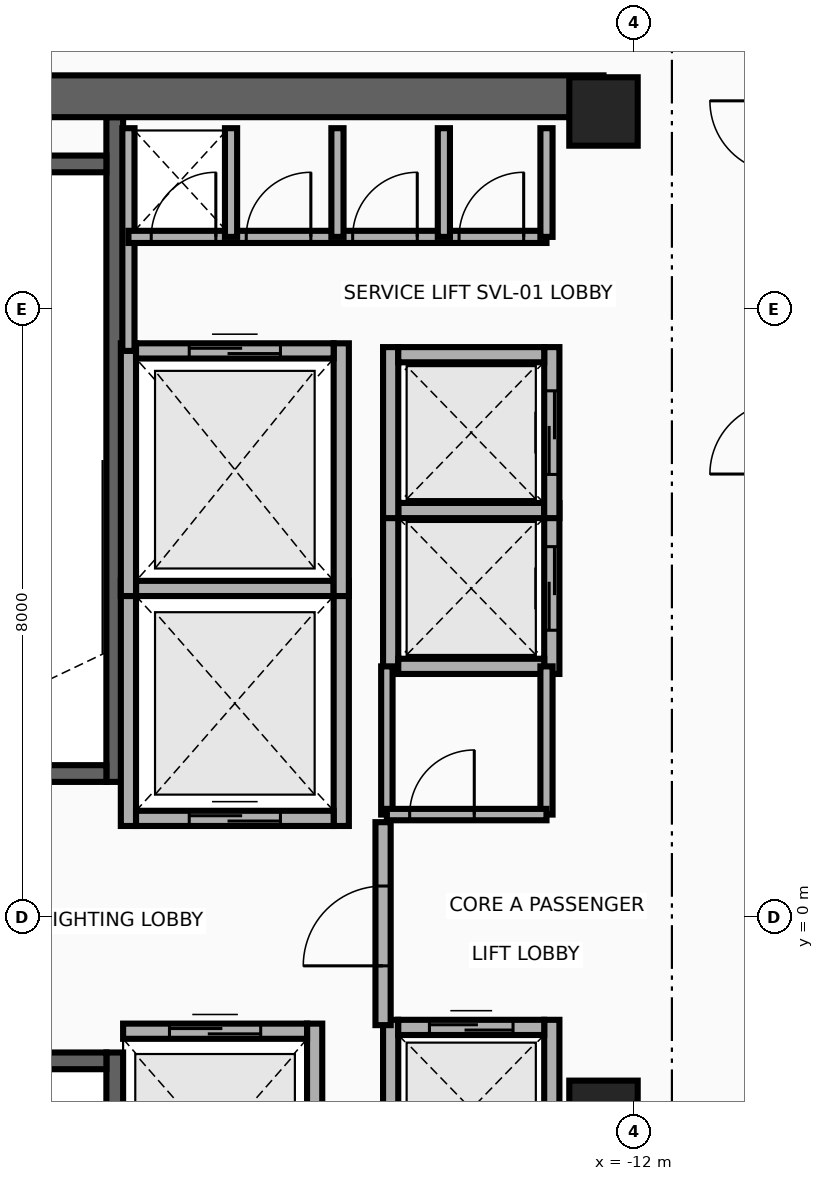
"""IFC4 building model, lengths in metres.
Left out: names, types, materials, properties, quantities, classifications, styles, units other than length and angle.
Written with IfcOpenShell. Run it as: python <this file> out.ifc"""

import sys

from ifc_helpers import new_model, si_unit, direction, frame, frame_2d, origin, origin_2d, place, context, subcontext, project, spatial, rectangle, extrude, source, transform, mapped, element, fill, save


model = new_model("IFC4")
c1 = context("Model", 3, precision=1e-05, world=origin(), true_north=direction((0.0, 1.0)))
c2 = subcontext(c1, "Body", "Model", "MODEL_VIEW")
j1 = project(units=[si_unit("LENGTHUNIT", "METRE"), si_unit("PLANEANGLEUNIT", "RADIAN")], contexts=[c1])
p1 = place(None, origin())
s1 = spatial("IfcSite", under=j1, at=p1, CompositionType="ELEMENT")
p2 = place(p1, origin())
s2 = spatial("IfcBuilding", under=s1, at=p2, CompositionType="ELEMENT")
p3 = place(p2, frame((0.0, 0.0, 216.0)))
s3 = spatial("IfcBuildingStorey", under=s2, at=p3, CompositionType="ELEMENT", Elevation=216.0)
p4 = place(p3, frame((-18.83, 1.78, 0.0), z_axis=(0.0, 0.0, 1.0), x_axis=(0.0, 1.0, 0.0)))
e1 = element("IfcWall", 1, at=p4, inside=s3, PredefinedType="SHEAR", context=c2, shape_type="SweptSolid", body=[
    extrude(rectangle(XDim=8.745, YDim=0.22, at=frame_2d((4.373, 0.0))), origin(), (0.0, 0.0, 1.0), 3.26),
])
p5 = place(p3, frame((-22.05, 1.89, 0.0), z_axis=(0.0, 0.0, 1.0), x_axis=(1.0, 0.0, 0.0)))
e2 = element("IfcWall", 2, at=p5, inside=s3, PredefinedType="SHEAR", context=c2, shape_type="SweptSolid", body=[
    extrude(rectangle(XDim=3.11, YDim=0.22, at=frame_2d((1.555, 0.0))), origin(), (0.0, 0.0, 1.0), 3.26),
])
p6 = place(p5, frame((1.0, 0.0, 0.0)))
e3 = element("IfcOpeningElement", 3, at=p6, cuts=e2, PredefinedType="OPENING", context=c2, shape_type="SweptSolid", body=[
    extrude(rectangle(XDim=1.1, YDim=2.15, at=frame_2d((0.55, 1.075))), frame((0.0, 0.125, 0.0), z_axis=(0.0, -1.0, 0.0), x_axis=(1.0, 0.0, 0.0)), (0.0, 0.0, 1.0), 0.25),
])
p7 = place(p3, frame((-22.05, 9.91, 0.0), z_axis=(0.0, 0.0, 1.0), x_axis=(1.0, 0.0, 0.0)))
e4 = element("IfcWall", 4, at=p7, inside=s3, PredefinedType="SHEAR", context=c2, shape_type="SweptSolid", body=[
    extrude(rectangle(XDim=3.11, YDim=0.22, at=frame_2d((1.555, 0.0))), origin(), (0.0, 0.0, 1.0), 3.26),
])
p8 = place(p3, frame((-18.83, -10.525, 0.0), z_axis=(0.0, 0.0, 1.0), x_axis=(0.0, 1.0, 0.0)))
e5 = element("IfcWall", 5, at=p8, inside=s3, PredefinedType="SHEAR", context=c2, shape_type="SweptSolid", body=[
    extrude(rectangle(XDim=8.745, YDim=0.22, at=frame_2d((4.373, 0.0))), origin(), (0.0, 0.0, 1.0), 3.26),
])
p9 = place(p3, frame((-22.05, -1.89, 0.0), z_axis=(0.0, 0.0, 1.0), x_axis=(1.0, 0.0, 0.0)))
e6 = element("IfcWall", 6, at=p9, inside=s3, PredefinedType="SHEAR", context=c2, shape_type="SweptSolid", body=[
    extrude(rectangle(XDim=3.11, YDim=0.22, at=frame_2d((1.555, 0.0))), origin(), (0.0, 0.0, 1.0), 3.26),
])
p10 = place(p9, frame((1.0, 0.0, 0.0)))
e7 = element("IfcOpeningElement", 7, at=p10, cuts=e6, PredefinedType="OPENING", context=c2, shape_type="SweptSolid", body=[
    extrude(rectangle(XDim=1.1, YDim=2.15, at=frame_2d((0.55, 1.075))), frame((0.0, 0.125, 0.0), z_axis=(0.0, -1.0, 0.0), x_axis=(1.0, 0.0, 0.0)), (0.0, 0.0, 1.0), 0.25),
])
p11 = place(p3, frame((-22.65, 10.8, 0.0), z_axis=(0.0, 0.0, 1.0), x_axis=(1.0, 0.0, 0.0)))
e8 = element("IfcWall", 8, at=p11, inside=s3, PredefinedType="SHEAR", context=c2, shape_type="SweptSolid", body=[
    extrude(rectangle(XDim=10.25, YDim=0.55, at=frame_2d((5.125, 0.0))), origin(), (0.0, 0.0, 1.0), 3.26),
])
m1 = source(origin(), c2, "Body", "SweptSolid", [
    extrude(rectangle(XDim=0.9, YDim=0.9, at=origin_2d()), origin(), (0.0, 0.0, 1.0), 3.5),
])
for number, where, z_axis, x_axis in (
    (9, (-12.4, -2.6, 0.0), (0.0, 0.0, 1.0), (1.0, 0.0, 0.0)),
    (10, (-12.4, 10.6, 0.0), (0.0, 0.0, 1.0), (1.0, 0.0, 0.0)),
):
    element("IfcColumn", number, at=place(p3, frame(where, z_axis=z_axis, x_axis=x_axis)), inside=s3, PredefinedType="COLUMN", context=c2, shape_type="MappedRepresentation", body=[
        mapped(m1, transform((0.0, 0.0, 0.0), x_axis=(1.0, 0.0, 0.0), y_axis=(0.0, 1.0, 0.0), z_axis=(0.0, 0.0, 1.0), scale=1.0)),
    ])
for number, where, z_axis, x_axis in (
    (11, (-18.65, 1.2, 0.0), (0.0, 0.0, 1.0), (0.0, 1.0, 0.0)),
    (12, (-15.85, 1.2, 0.0), (0.0, 0.0, 1.0), (0.0, 1.0, 0.0)),
):
    element("IfcWall", number, at=place(p3, frame(where, z_axis=z_axis, x_axis=x_axis)), inside=s3, PredefinedType="MOVABLE", context=c2, shape_type="SweptSolid", body=[
        extrude(rectangle(XDim=3.225, YDim=0.2, at=frame_2d((1.613, 0.0))), origin(), (0.0, 0.0, 1.0), 3.26),
    ])
p12 = place(p3, frame((-18.55, 1.3, 0.0), z_axis=(0.0, 0.0, 1.0), x_axis=(1.0, 0.0, 0.0)))
e13 = element("IfcWall", 13, at=p12, inside=s3, PredefinedType="MOVABLE", context=c2, shape_type="SweptSolid", body=[
    extrude(rectangle(XDim=2.6, YDim=0.2, at=frame_2d((1.3, 0.0))), origin(), (0.0, 0.0, 1.0), 3.26),
])
p13 = place(p12, frame((0.7, 0.0, 0.0)))
e14 = element("IfcOpeningElement", 14, at=p13, cuts=e13, PredefinedType="OPENING", context=c2, shape_type="SweptSolid", body=[
    extrude(rectangle(XDim=1.2, YDim=2.1, at=frame_2d((0.6, 1.05))), frame((0.0, 0.115, 0.0), z_axis=(0.0, -1.0, 0.0), x_axis=(1.0, 0.0, 0.0)), (0.0, 0.0, 1.0), 0.23),
])
p14 = place(p3, frame((-18.55, 4.325, 0.0), z_axis=(0.0, 0.0, 1.0), x_axis=(1.0, 0.0, 0.0)))
e15 = element("IfcWall", 15, at=p14, inside=s3, PredefinedType="MOVABLE", context=c2, shape_type="SweptSolid", body=[
    extrude(rectangle(XDim=2.6, YDim=0.2, at=frame_2d((1.3, 0.0))), origin(), (0.0, 0.0, 1.0), 3.26),
])
p15 = place(p3, frame((-16.2, -4.6, 0.0), z_axis=(0.0, 0.0, 1.0), x_axis=(0.0, 1.0, 0.0)))
e16 = element("IfcWall", 16, at=p15, inside=s3, PredefinedType="MOVABLE", context=c2, shape_type="SweptSolid", body=[
    extrude(rectangle(XDim=3.2, YDim=0.2, at=frame_2d((1.6, 0.0))), origin(), (0.0, 0.0, 1.0), 3.26),
])
p16 = place(p3, frame((-18.72, -1.5, 0.0), z_axis=(0.0, 0.0, 1.0), x_axis=(1.0, 0.0, 0.0)))
e17 = element("IfcWall", 17, at=p16, inside=s3, PredefinedType="MOVABLE", context=c2, shape_type="SweptSolid", body=[
    extrude(rectangle(XDim=2.42, YDim=0.2, at=frame_2d((1.21, 0.0))), origin(), (0.0, 0.0, 1.0), 3.26),
])
p17 = place(p16, frame((0.61, 0.0, 0.0)))
e18 = element("IfcOpeningElement", 18, at=p17, cuts=e17, PredefinedType="OPENING", context=c2, shape_type="SweptSolid", body=[
    extrude(rectangle(XDim=1.2, YDim=2.1, at=frame_2d((0.6, 1.05))), frame((0.0, 0.115, 0.0), z_axis=(0.0, -1.0, 0.0), x_axis=(1.0, 0.0, 0.0)), (0.0, 0.0, 1.0), 0.23),
])
for number, where, z_axis, x_axis in (
    (19, (-18.65, 4.225, 0.0), (0.0, 0.0, 1.0), (0.0, 1.0, 0.0)),
    (20, (-15.85, 4.225, 0.0), (0.0, 0.0, 1.0), (0.0, 1.0, 0.0)),
):
    element("IfcWall", number, at=place(p3, frame(where, z_axis=z_axis, x_axis=x_axis)), inside=s3, PredefinedType="MOVABLE", context=c2, shape_type="SweptSolid", body=[
        extrude(rectangle(XDim=3.325, YDim=0.2, at=frame_2d((1.663, 0.0))), origin(), (0.0, 0.0, 1.0), 3.26),
    ])
p18 = place(p3, frame((-18.55, 7.45, 0.0), z_axis=(0.0, 0.0, 1.0), x_axis=(1.0, 0.0, 0.0)))
e21 = element("IfcWall", 21, at=p18, inside=s3, PredefinedType="MOVABLE", context=c2, shape_type="SweptSolid", body=[
    extrude(rectangle(XDim=2.6, YDim=0.2, at=frame_2d((1.3, 0.0))), origin(), (0.0, 0.0, 1.0), 3.26),
])
p19 = place(p18, frame((0.7, 0.0, 0.0)))
e22 = element("IfcOpeningElement", 22, at=p19, cuts=e21, PredefinedType="OPENING", context=c2, shape_type="SweptSolid", body=[
    extrude(rectangle(XDim=1.2, YDim=2.1, at=frame_2d((0.6, 1.05))), frame((0.0, 0.115, 0.0), z_axis=(0.0, -1.0, 0.0), x_axis=(1.0, 0.0, 0.0)), (0.0, 0.0, 1.0), 0.23),
])
p20 = place(p3, frame((-15.2, 3.2, 0.0), z_axis=(0.0, 0.0, 1.0), x_axis=(0.0, 1.0, 0.0)))
e23 = element("IfcWall", 23, at=p20, inside=s3, PredefinedType="MOVABLE", context=c2, shape_type="SweptSolid", body=[
    extrude(rectangle(XDim=2.25, YDim=0.2, at=frame_2d((1.125, 0.0))), origin(), (0.0, 0.0, 1.0), 3.26),
])
p21 = place(p3, frame((-13.08, 3.2, 0.0), z_axis=(0.0, 0.0, 1.0), x_axis=(0.0, 1.0, 0.0)))
e24 = element("IfcWall", 24, at=p21, inside=s3, PredefinedType="MOVABLE", context=c2, shape_type="SweptSolid", body=[
    extrude(rectangle(XDim=2.25, YDim=0.2, at=frame_2d((1.125, 0.0))), origin(), (0.0, 0.0, 1.0), 3.26),
])
p22 = place(p21, frame((0.575, 0.0, 0.0)))
e25 = element("IfcOpeningElement", 25, at=p22, cuts=e24, PredefinedType="OPENING", context=c2, shape_type="SweptSolid", body=[
    extrude(rectangle(XDim=1.1, YDim=2.1, at=frame_2d((0.55, 1.05))), frame((0.0, 0.115, 0.0), z_axis=(0.0, -1.0, 0.0), x_axis=(1.0, 0.0, 0.0)), (0.0, 0.0, 1.0), 0.23),
])
for number, where, z_axis, x_axis in (
    (26, (-15.1, 3.3, 0.0), (0.0, 0.0, 1.0), (1.0, 0.0, 0.0)),
    (27, (-15.1, 5.35, 0.0), (0.0, 0.0, 1.0), (1.0, 0.0, 0.0)),
):
    element("IfcWall", number, at=place(p3, frame(where, z_axis=z_axis, x_axis=x_axis)), inside=s3, PredefinedType="MOVABLE", context=c2, shape_type="SweptSolid", body=[
        extrude(rectangle(XDim=1.92, YDim=0.2, at=frame_2d((0.96, 0.0))), origin(), (0.0, 0.0, 1.0), 3.26),
    ])
p23 = place(p3, frame((-15.2, 5.25, 0.0), z_axis=(0.0, 0.0, 1.0), x_axis=(0.0, 1.0, 0.0)))
e28 = element("IfcWall", 28, at=p23, inside=s3, PredefinedType="MOVABLE", context=c2, shape_type="SweptSolid", body=[
    extrude(rectangle(XDim=2.25, YDim=0.2, at=frame_2d((1.125, 0.0))), origin(), (0.0, 0.0, 1.0), 3.26),
])
p24 = place(p3, frame((-13.08, 5.25, 0.0), z_axis=(0.0, 0.0, 1.0), x_axis=(0.0, 1.0, 0.0)))
e29 = element("IfcWall", 29, at=p24, inside=s3, PredefinedType="MOVABLE", context=c2, shape_type="SweptSolid", body=[
    extrude(rectangle(XDim=2.25, YDim=0.2, at=frame_2d((1.125, 0.0))), origin(), (0.0, 0.0, 1.0), 3.26),
])
p25 = place(p24, frame((0.575, 0.0, 0.0)))
e30 = element("IfcOpeningElement", 30, at=p25, cuts=e29, PredefinedType="OPENING", context=c2, shape_type="SweptSolid", body=[
    extrude(rectangle(XDim=1.1, YDim=2.1, at=frame_2d((0.55, 1.05))), frame((0.0, 0.115, 0.0), z_axis=(0.0, -1.0, 0.0), x_axis=(1.0, 0.0, 0.0)), (0.0, 0.0, 1.0), 0.23),
])
p26 = place(p3, frame((-15.1, 7.4, 0.0), z_axis=(0.0, 0.0, 1.0), x_axis=(1.0, 0.0, 0.0)))
e31 = element("IfcWall", 31, at=p26, inside=s3, PredefinedType="MOVABLE", context=c2, shape_type="SweptSolid", body=[
    extrude(rectangle(XDim=1.92, YDim=0.2, at=frame_2d((0.96, 0.0))), origin(), (0.0, 0.0, 1.0), 3.26),
])
for number, where, z_axis, x_axis in (
    (32, (-15.2, -3.7, 0.0), (0.0, 0.0, 1.0), (0.0, 1.0, 0.0)),
    (33, (-13.08, -3.7, 0.0), (0.0, 0.0, 1.0), (0.0, 1.0, 0.0)),
):
    element("IfcWall", number, at=place(p3, frame(where, z_axis=z_axis, x_axis=x_axis)), inside=s3, PredefinedType="MOVABLE", context=c2, shape_type="SweptSolid", body=[
        extrude(rectangle(XDim=2.35, YDim=0.2, at=frame_2d((1.175, 0.0))), origin(), (0.0, 0.0, 1.0), 3.26),
    ])
p27 = place(p3, frame((-15.1, -1.45, 0.0), z_axis=(0.0, 0.0, 1.0), x_axis=(1.0, 0.0, 0.0)))
e34 = element("IfcWall", 34, at=p27, inside=s3, PredefinedType="MOVABLE", context=c2, shape_type="SweptSolid", body=[
    extrude(rectangle(XDim=1.92, YDim=0.2, at=frame_2d((0.96, 0.0))), origin(), (0.0, 0.0, 1.0), 3.26),
])
p28 = place(p27, frame((0.41, 0.0, 0.0)))
e35 = element("IfcOpeningElement", 35, at=p28, cuts=e34, PredefinedType="OPENING", context=c2, shape_type="SweptSolid", body=[
    extrude(rectangle(XDim=1.1, YDim=2.1, at=frame_2d((0.55, 1.05))), frame((0.0, 0.115, 0.0), z_axis=(0.0, -1.0, 0.0), x_axis=(1.0, 0.0, 0.0)), (0.0, 0.0, 1.0), 0.23),
])
p29 = place(p3, frame((-15.3, -1.42, 0.0), z_axis=(0.0, 0.0, 1.0), x_axis=(0.0, 1.0, 0.0)))
e36 = element("IfcWall", 36, at=p29, inside=s3, PredefinedType="PARTITIONING", context=c2, shape_type="SweptSolid", body=[
    extrude(rectangle(XDim=2.67, YDim=0.2, at=frame_2d((1.335, 0.0))), origin(), (0.0, 0.0, 1.0), 3.26),
])
p30 = place(p29, frame((0.78, 0.0, 0.0)))
e37 = element("IfcOpeningElement", 37, at=p30, cuts=e36, PredefinedType="OPENING", context=c2, shape_type="SweptSolid", body=[
    extrude(rectangle(XDim=1.05, YDim=2.15, at=frame_2d((0.525, 1.075))), frame((0.0, 0.115, 0.0), z_axis=(0.0, -1.0, 0.0), x_axis=(1.0, 0.0, 0.0)), (0.0, 0.0, 1.0), 0.23),
])
p31 = place(p3, frame((-18.65, 7.45, 0.0), z_axis=(0.0, 0.0, 1.0), x_axis=(0.0, 1.0, 0.0)))
e38 = element("IfcWall", 38, at=p31, inside=s3, PredefinedType="PARTITIONING", context=c2, shape_type="SweptSolid", body=[
    extrude(rectangle(XDim=2.93, YDim=0.16, at=frame_2d((1.465, 0.0))), origin(), (0.0, 0.0, 1.0), 3.26),
])
p32 = place(p3, frame((-18.65, 8.95, 0.0), z_axis=(0.0, 0.0, 1.0), x_axis=(1.0, 0.0, 0.0)))
e39 = element("IfcWall", 39, at=p32, inside=s3, PredefinedType="PARTITIONING", context=c2, shape_type="SweptSolid", body=[
    extrude(rectangle(XDim=5.5, YDim=0.16, at=frame_2d((2.75, 0.0))), origin(), (0.0, 0.0, 1.0), 3.26),
])
p33 = place(p32, frame((0.3, 0.0, 0.0)))
e40 = element("IfcOpeningElement", 40, at=p33, cuts=e39, PredefinedType="OPENING", context=c2, shape_type="SweptSolid", body=[
    extrude(rectangle(XDim=0.85, YDim=2.05, at=frame_2d((0.425, 1.025))), frame((0.0, 0.095, 0.0), z_axis=(0.0, -1.0, 0.0), x_axis=(1.0, 0.0, 0.0)), (0.0, 0.0, 1.0), 0.19),
])
p34 = place(p32, frame((1.55, 0.0, 0.0)))
e41 = element("IfcOpeningElement", 41, at=p34, cuts=e39, PredefinedType="OPENING", context=c2, shape_type="SweptSolid", body=[
    extrude(rectangle(XDim=0.85, YDim=2.05, at=frame_2d((0.425, 1.025))), frame((0.0, 0.095, 0.0), z_axis=(0.0, -1.0, 0.0), x_axis=(1.0, 0.0, 0.0)), (0.0, 0.0, 1.0), 0.19),
])
p35 = place(p32, frame((2.95, 0.0, 0.0)))
e42 = element("IfcOpeningElement", 42, at=p35, cuts=e39, PredefinedType="OPENING", context=c2, shape_type="SweptSolid", body=[
    extrude(rectangle(XDim=0.85, YDim=2.05, at=frame_2d((0.425, 1.025))), frame((0.0, 0.095, 0.0), z_axis=(0.0, -1.0, 0.0), x_axis=(1.0, 0.0, 0.0)), (0.0, 0.0, 1.0), 0.19),
])
p36 = place(p32, frame((4.35, 0.0, 0.0)))
e43 = element("IfcOpeningElement", 43, at=p36, cuts=e39, PredefinedType="OPENING", context=c2, shape_type="SweptSolid", body=[
    extrude(rectangle(XDim=0.85, YDim=2.05, at=frame_2d((0.425, 1.025))), frame((0.0, 0.095, 0.0), z_axis=(0.0, -1.0, 0.0), x_axis=(1.0, 0.0, 0.0)), (0.0, 0.0, 1.0), 0.19),
])
for number, where, z_axis, x_axis in (
    (44, (-13.15, 8.95, 0.0), (0.0, 0.0, 1.0), (0.0, 1.0, 0.0)),
    (45, (-17.3, 8.95, 0.0), (0.0, 0.0, 1.0), (0.0, 1.0, 0.0)),
    (46, (-15.9, 8.95, 0.0), (0.0, 0.0, 1.0), (0.0, 1.0, 0.0)),
    (47, (-14.5, 8.95, 0.0), (0.0, 0.0, 1.0), (0.0, 1.0, 0.0)),
):
    element("IfcWall", number, at=place(p3, frame(where, z_axis=z_axis, x_axis=x_axis)), inside=s3, PredefinedType="PARTITIONING", context=c2, shape_type="SweptSolid", body=[
        extrude(rectangle(XDim=1.43, YDim=0.16, at=frame_2d((0.715, 0.0))), origin(), (0.0, 0.0, 1.0), 3.26),
    ])
p37 = place(p3, frame((-13.15, 1.35, 0.0), z_axis=(0.0, 0.0, 1.0), x_axis=(0.0, 1.0, 0.0)))
e48 = element("IfcWall", 48, at=p37, inside=s3, PredefinedType="PARTITIONING", context=c2, shape_type="SweptSolid", body=[
    extrude(rectangle(XDim=1.95, YDim=0.16, at=frame_2d((0.975, 0.0))), origin(), (0.0, 0.0, 1.0), 3.26),
])
p38 = place(p3, frame((-15.25, 1.35, 0.0), z_axis=(0.0, 0.0, 1.0), x_axis=(0.0, 1.0, 0.0)))
e49 = element("IfcWall", 49, at=p38, inside=s3, PredefinedType="PARTITIONING", context=c2, shape_type="SweptSolid", body=[
    extrude(rectangle(XDim=1.95, YDim=0.15, at=frame_2d((0.975, 0.0))), origin(), (0.0, 0.0, 1.0), 3.26),
])
p39 = place(p3, frame((-15.25, 1.35, 0.0), z_axis=(0.0, 0.0, 1.0), x_axis=(1.0, 0.0, 0.0)))
e50 = element("IfcWall", 50, at=p39, inside=s3, PredefinedType="PARTITIONING", context=c2, shape_type="SweptSolid", body=[
    extrude(rectangle(XDim=2.1, YDim=0.15, at=frame_2d((1.05, 0.0))), origin(), (0.0, 0.0, 1.0), 3.26),
])
p40 = place(p39, frame((0.3, 0.0, 0.0)))
e51 = element("IfcOpeningElement", 51, at=p40, cuts=e50, PredefinedType="OPENING", context=c2, shape_type="SweptSolid", body=[
    extrude(rectangle(XDim=0.85, YDim=2.05, at=frame_2d((0.425, 1.025))), frame((0.0, 0.09, 0.0), z_axis=(0.0, -1.0, 0.0), x_axis=(1.0, 0.0, 0.0)), (0.0, 0.0, 1.0), 0.18),
])
p41 = place(p13, origin())
e52 = element("IfcDoor", 52, at=p41, inside=s3, OperationType="DOUBLE_DOOR_SLIDING", PredefinedType="DOOR", context=c2, shape_type="SweptSolid", body=[
    extrude(rectangle(XDim=1.2, YDim=2.1, at=frame_2d((0.6, 1.05))), frame((0.0, 0.025, 0.0), z_axis=(0.0, -1.0, 0.0), x_axis=(1.0, 0.0, 0.0)), (0.0, 0.0, 1.0), 0.05),
])
fill(e14, e52)
p42 = place(p17, origin())
e53 = element("IfcDoor", 53, at=p42, inside=s3, OperationType="DOUBLE_DOOR_SLIDING", PredefinedType="DOOR", context=c2, shape_type="SweptSolid", body=[
    extrude(rectangle(XDim=1.2, YDim=2.1, at=frame_2d((0.6, 1.05))), frame((0.0, 0.025, 0.0), z_axis=(0.0, -1.0, 0.0), x_axis=(1.0, 0.0, 0.0)), (0.0, 0.0, 1.0), 0.05),
])
fill(e18, e53)
p43 = place(p19, origin())
e54 = element("IfcDoor", 54, at=p43, inside=s3, OperationType="DOUBLE_DOOR_SLIDING", PredefinedType="DOOR", context=c2, shape_type="SweptSolid", body=[
    extrude(rectangle(XDim=1.2, YDim=2.1, at=frame_2d((0.6, 1.05))), frame((0.0, 0.025, 0.0), z_axis=(0.0, -1.0, 0.0), x_axis=(1.0, 0.0, 0.0)), (0.0, 0.0, 1.0), 0.05),
])
fill(e22, e54)
p44 = place(p22, origin())
e55 = element("IfcDoor", 55, at=p44, inside=s3, OperationType="DOUBLE_DOOR_SLIDING", PredefinedType="DOOR", context=c2, shape_type="SweptSolid", body=[
    extrude(rectangle(XDim=1.1, YDim=2.1, at=frame_2d((0.55, 1.05))), frame((0.0, 0.025, 0.0), z_axis=(0.0, -1.0, 0.0), x_axis=(1.0, 0.0, 0.0)), (0.0, 0.0, 1.0), 0.05),
])
fill(e25, e55)
p45 = place(p25, origin())
e56 = element("IfcDoor", 56, at=p45, inside=s3, OperationType="DOUBLE_DOOR_SLIDING", PredefinedType="DOOR", context=c2, shape_type="SweptSolid", body=[
    extrude(rectangle(XDim=1.1, YDim=2.1, at=frame_2d((0.55, 1.05))), frame((0.0, 0.025, 0.0), z_axis=(0.0, -1.0, 0.0), x_axis=(1.0, 0.0, 0.0)), (0.0, 0.0, 1.0), 0.05),
])
fill(e30, e56)
p46 = place(p28, origin())
e57 = element("IfcDoor", 57, at=p46, inside=s3, OperationType="DOUBLE_DOOR_SLIDING", PredefinedType="DOOR", context=c2, shape_type="SweptSolid", body=[
    extrude(rectangle(XDim=1.1, YDim=2.1, at=frame_2d((0.55, 1.05))), frame((0.0, 0.025, 0.0), z_axis=(0.0, -1.0, 0.0), x_axis=(1.0, 0.0, 0.0)), (0.0, 0.0, 1.0), 0.05),
])
fill(e35, e57)
p47 = place(p30, origin())
e58 = element("IfcDoor", 58, at=p47, inside=s3, OperationType="SINGLE_SWING_RIGHT", PredefinedType="DOOR", context=c2, shape_type="SweptSolid", body=[
    extrude(rectangle(XDim=1.05, YDim=2.15, at=frame_2d((0.525, 1.075))), frame((0.0, 0.025, 0.0), z_axis=(0.0, -1.0, 0.0), x_axis=(1.0, 0.0, 0.0)), (0.0, 0.0, 1.0), 0.05),
])
fill(e37, e58)
p48 = place(p33, origin())
e59 = element("IfcDoor", 59, at=p48, inside=s3, OperationType="SINGLE_SWING_LEFT", PredefinedType="DOOR", context=c2, shape_type="SweptSolid", body=[
    extrude(rectangle(XDim=0.85, YDim=2.05, at=frame_2d((0.425, 1.025))), frame((0.0, 0.025, 0.0), z_axis=(0.0, -1.0, 0.0), x_axis=(1.0, 0.0, 0.0)), (0.0, 0.0, 1.0), 0.05),
])
fill(e40, e59)
p49 = place(p34, origin())
e60 = element("IfcDoor", 60, at=p49, inside=s3, OperationType="SINGLE_SWING_RIGHT", PredefinedType="DOOR", context=c2, shape_type="SweptSolid", body=[
    extrude(rectangle(XDim=0.85, YDim=2.05, at=frame_2d((0.425, 1.025))), frame((0.0, 0.025, 0.0), z_axis=(0.0, -1.0, 0.0), x_axis=(1.0, 0.0, 0.0)), (0.0, 0.0, 1.0), 0.05),
])
fill(e41, e60)
p50 = place(p35, origin())
e61 = element("IfcDoor", 61, at=p50, inside=s3, OperationType="SINGLE_SWING_LEFT", PredefinedType="DOOR", context=c2, shape_type="SweptSolid", body=[
    extrude(rectangle(XDim=0.85, YDim=2.05, at=frame_2d((0.425, 1.025))), frame((0.0, 0.025, 0.0), z_axis=(0.0, -1.0, 0.0), x_axis=(1.0, 0.0, 0.0)), (0.0, 0.0, 1.0), 0.05),
])
fill(e42, e61)
p51 = place(p36, origin())
e62 = element("IfcDoor", 62, at=p51, inside=s3, OperationType="SINGLE_SWING_RIGHT", PredefinedType="DOOR", context=c2, shape_type="SweptSolid", body=[
    extrude(rectangle(XDim=0.85, YDim=2.05, at=frame_2d((0.425, 1.025))), frame((0.0, 0.025, 0.0), z_axis=(0.0, -1.0, 0.0), x_axis=(1.0, 0.0, 0.0)), (0.0, 0.0, 1.0), 0.05),
])
fill(e43, e62)
p52 = place(p40, origin())
e63 = element("IfcDoor", 63, at=p52, inside=s3, OperationType="SINGLE_SWING_RIGHT", PredefinedType="DOOR", context=c2, shape_type="SweptSolid", body=[
    extrude(rectangle(XDim=0.85, YDim=2.05, at=frame_2d((0.425, 1.025))), frame((0.0, 0.025, 0.0), z_axis=(0.0, -1.0, 0.0), x_axis=(1.0, 0.0, 0.0)), (0.0, 0.0, 1.0), 0.05),
])
fill(e51, e63)
save(model, sys.argv[1])
